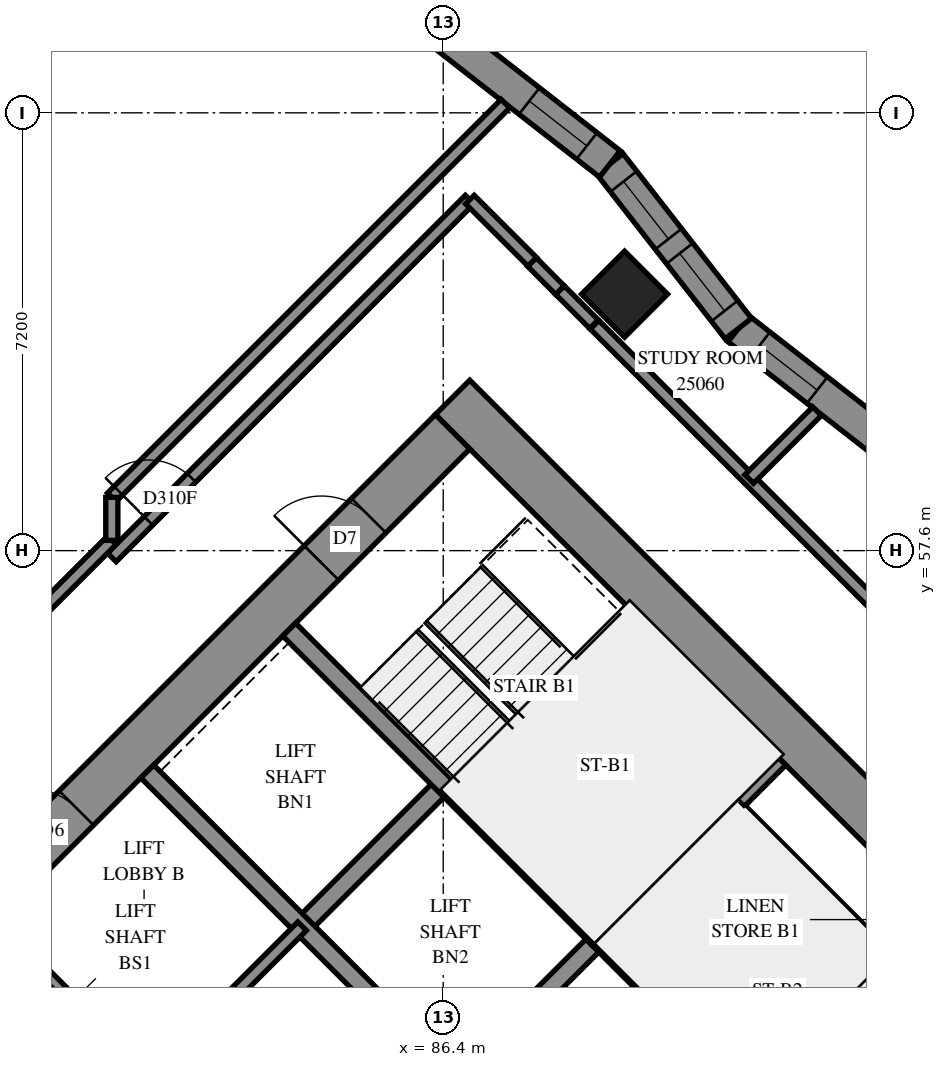
"""IFC4 building model, lengths in metres.
Left out: names, types, materials, properties, quantities, classifications, styles, units other than length and angle.
Written with IfcOpenShell. Run it as: python <this file> out.ifc"""

import sys

from ifc_helpers import new_model, si_unit, direction, frame, frame_2d, origin, origin_2d, place, context, subcontext, project, spatial, polyline, rectangle, outline, extrude, element, fill, save


model = new_model("IFC4")
c1 = context("Model", 3, precision=1e-05, world=origin(), true_north=direction((0.0, 1.0)))
c2 = subcontext(c1, "Body", "Model", "MODEL_VIEW")
j1 = project(units=[si_unit("LENGTHUNIT", "METRE"), si_unit("PLANEANGLEUNIT", "RADIAN")], contexts=[c1])
p1 = place(None, origin())
s1 = spatial("IfcSite", under=j1, at=p1, CompositionType="ELEMENT")
p2 = place(p1, origin())
s2 = spatial("IfcBuilding", under=s1, at=p2, CompositionType="ELEMENT")
p3 = place(p2, frame((0.0, 0.0, 94.8)))
s3 = spatial("IfcBuildingStorey", under=s2, at=p3, CompositionType="ELEMENT", Elevation=94.8)
p4 = place(p3, frame((89.382, 61.818, 0.0), z_axis=(0.0, 0.0, 1.0), x_axis=(0.7071067812, -0.7071067812, 0.0)))
e1 = element("IfcColumn", 1, at=p4, inside=s3, PredefinedType="COLUMN", context=c2, shape_type="SweptSolid", body=[
    extrude(rectangle(XDim=1.0, YDim=1.0, at=origin_2d()), origin(), (0.0, 0.0, 1.0), 3.1),
])
p5 = place(p3, frame((86.554, 60.121, -0.3), z_axis=(0.0, 0.0, 1.0), x_axis=(0.7071067812, -0.7071067812, 0.0)))
e2 = element("IfcWall", 2, at=p5, inside=s3, PredefinedType="SHEAR", context=c2, shape_type="SweptSolid", body=[
    extrude(rectangle(XDim=16.0, YDim=0.8, at=frame_2d((8.0, 0.0))), origin(), (0.0, 0.0, 1.0), 2.7),
])
p6 = place(p5, frame((10.8, 0.0, 0.3)))
e3 = element("IfcOpeningElement", 3, at=p6, cuts=e2, PredefinedType="OPENING", context=c2, shape_type="SweptSolid", body=[
    extrude(rectangle(XDim=0.8, YDim=2.1, at=frame_2d((0.4, 1.05))), frame((0.0, 0.41, 0.0), z_axis=(0.0, -1.0, 0.0), x_axis=(1.0, 0.0, 0.0)), (0.0, 0.0, 1.0), 0.82),
])
p7 = place(p3, frame((76.372, 49.373, -0.3), z_axis=(0.0, 0.0, 1.0), x_axis=(0.7071067812, 0.7071067812, 0.0)))
e4 = element("IfcWall", 4, at=p7, inside=s3, PredefinedType="SHEAR", context=c2, shape_type="SweptSolid", body=[
    extrude(rectangle(XDim=14.4, YDim=0.8, at=frame_2d((7.2, 0.0))), origin(), (0.0, 0.0, 1.0), 2.7),
])
p8 = place(p7, frame((4.55, 0.0, 0.3)))
e5 = element("IfcOpeningElement", 5, at=p8, cuts=e4, PredefinedType="OPENING", context=c2, shape_type="SweptSolid", body=[
    extrude(rectangle(XDim=1.1, YDim=2.1, at=frame_2d((0.55, 1.05))), frame((0.0, 0.41, 0.0), z_axis=(0.0, -1.0, 0.0), x_axis=(1.0, 0.0, 0.0)), (0.0, 0.0, 1.0), 0.82),
])
p9 = place(p7, frame((11.35, 0.0, 0.3)))
e6 = element("IfcOpeningElement", 6, at=p9, cuts=e4, PredefinedType="OPENING", context=c2, shape_type="SweptSolid", body=[
    extrude(rectangle(XDim=1.1, YDim=2.1, at=frame_2d((0.55, 1.05))), frame((0.0, 0.41, 0.0), z_axis=(0.0, -1.0, 0.0), x_axis=(1.0, 0.0, 0.0)), (0.0, 0.0, 1.0), 0.82),
])
p10 = place(p3, frame((84.079, 51.423, 0.0), z_axis=(0.0, 0.0, 1.0), x_axis=(0.7071219326, 0.7070916295, 0.0)))
e7 = element("IfcWall", 7, at=p10, inside=s3, PredefinedType="SOLIDWALL", context=c2, shape_type="SweptSolid", body=[
    extrude(rectangle(XDim=3.3, YDim=0.3, at=frame_2d((1.65, 0.0))), origin(), (0.0, 0.0, 1.0), 3.1),
])
p11 = place(p3, frame((86.625, 48.878, 0.0), z_axis=(0.0, 0.0, 1.0), x_axis=(0.7071067812, 0.7071067812, 0.0)))
e8 = element("IfcWall", 8, at=p11, inside=s3, PredefinedType="SOLIDWALL", context=c2, shape_type="SweptSolid", body=[
    extrude(rectangle(XDim=3.3, YDim=0.3, at=frame_2d((1.65, 0.0))), origin(), (0.0, 0.0, 1.0), 3.1),
])
p12 = place(p3, frame((78.988, 51.423, 0.0), z_axis=(0.0, 0.0, 1.0), x_axis=(0.7071067812, -0.7071067812, 0.0)))
e9 = element("IfcWall", 9, at=p12, inside=s3, PredefinedType="SOLIDWALL", context=c2, shape_type="SweptSolid", body=[
    extrude(rectangle(XDim=14.4, YDim=0.3, at=frame_2d((7.2, 0.0))), origin(), (0.0, 0.0, 1.0), 3.1),
])
p13 = place(p12, frame((1.25, 0.0, 0.0)))
e10 = element("IfcOpeningElement", 10, at=p13, cuts=e9, PredefinedType="OPENING", context=c2, shape_type="SweptSolid", body=[
    extrude(rectangle(XDim=1.1, YDim=2.1, at=frame_2d((0.55, 1.05))), frame((0.0, 0.16, 0.0), z_axis=(0.0, -1.0, 0.0), x_axis=(1.0, 0.0, 0.0)), (0.0, 0.0, 1.0), 0.32),
])
p14 = place(p12, frame((4.85, 0.0, 0.0)))
e11 = element("IfcOpeningElement", 11, at=p14, cuts=e9, PredefinedType="OPENING", context=c2, shape_type="SweptSolid", body=[
    extrude(rectangle(XDim=1.1, YDim=2.1, at=frame_2d((0.55, 1.05))), frame((0.0, 0.16, 0.0), z_axis=(0.0, -1.0, 0.0), x_axis=(1.0, 0.0, 0.0)), (0.0, 0.0, 1.0), 0.32),
])
p15 = place(p12, frame((8.45, 0.0, 0.0)))
e12 = element("IfcOpeningElement", 12, at=p15, cuts=e9, PredefinedType="OPENING", context=c2, shape_type="SweptSolid", body=[
    extrude(rectangle(XDim=1.1, YDim=2.1, at=frame_2d((0.55, 1.05))), frame((0.0, 0.16, 0.0), z_axis=(0.0, -1.0, 0.0), x_axis=(1.0, 0.0, 0.0)), (0.0, 0.0, 1.0), 0.32),
])
p16 = place(p12, frame((12.05, 0.0, 0.0)))
e13 = element("IfcOpeningElement", 13, at=p16, cuts=e9, PredefinedType="OPENING", context=c2, shape_type="SweptSolid", body=[
    extrude(rectangle(XDim=1.1, YDim=2.1, at=frame_2d((0.55, 1.05))), frame((0.0, 0.16, 0.0), z_axis=(0.0, -1.0, 0.0), x_axis=(1.0, 0.0, 0.0)), (0.0, 0.0, 1.0), 0.32),
])
p17 = place(p3, frame((81.534, 53.969, 0.0), z_axis=(0.0, 0.0, 1.0), x_axis=(0.707103309, -0.7071102534, 0.0)))
e14 = element("IfcWall", 14, at=p17, inside=s3, PredefinedType="SOLIDWALL", context=c2, shape_type="SweptSolid", body=[
    extrude(rectangle(XDim=14.4, YDim=0.3, at=frame_2d((7.2, 0.0))), origin(), (0.0, 0.0, 1.0), 3.1),
])
p18 = place(p17, frame((12.05, 0.0, 0.0)))
e15 = element("IfcOpeningElement", 15, at=p18, cuts=e14, PredefinedType="OPENING", context=c2, shape_type="SweptSolid", body=[
    extrude(rectangle(XDim=1.1, YDim=2.1, at=frame_2d((0.55, 1.05))), frame((0.0, 0.16, 0.0), z_axis=(0.0, -1.0, 0.0), x_axis=(1.0, 0.0, 0.0)), (0.0, 0.0, 1.0), 0.32),
])
for number, where, z_axis, x_axis in (
    (16, (83.867, 56.302, 0.0), (0.0, 0.0, 1.0), (0.707, -0.707, 0.0)),
    (17, (88.958, 51.211, 0.0), (0.0, 0.0, 1.0), (0.707, -0.707, 0.0)),
):
    element("IfcWall", number, at=place(p3, frame(where, z_axis=z_axis, x_axis=x_axis)), inside=s3, PredefinedType="SOLIDWALL", context=c2, shape_type="SweptSolid", body=[
        extrude(rectangle(XDim=7.2, YDim=0.3, at=frame_2d((3.6, 0.0))), origin(), (0.0, 0.0, 1.0), 3.1),
    ])
p19 = place(p3, frame((88.958, 51.211, 0.0), z_axis=(0.0, 0.0, 1.0), x_axis=(0.7071067812, 0.7071067812, 0.0)))
e18 = element("IfcWall", 18, at=p19, inside=s3, PredefinedType="SOLIDWALL", context=c2, shape_type="SweptSolid", body=[
    extrude(rectangle(XDim=4.2, YDim=0.3, at=frame_2d((2.1, 0.0))), origin(), (0.0, 0.0, 1.0), 3.1),
])
p20 = place(p3, frame((93.961, 59.139, 0.0), z_axis=(0.0, 0.0, 1.0), x_axis=(-0.788454577, 0.6150929849, 0.0)))
e19 = element("IfcWall", 19, at=p20, inside=s3, PredefinedType="SOLIDWALL", context=c2, shape_type="SweptSolid", body=[
    extrude(outline(polyline([(-0.034, -0.275), (3.401, -0.275), (3.468, 0.275), (0.034, 0.275), (-0.034, -0.275)])), origin(), (0.0, 0.0, 1.0), 3.1),
])
p21 = place(p20, frame((1.789, 0.0, 0.5)))
e20 = element("IfcOpeningElement", 20, at=p21, cuts=e19, PredefinedType="OPENING", context=c2, shape_type="SweptSolid", body=[
    extrude(rectangle(XDim=1.2, YDim=2.45, at=frame_2d((0.6, 1.225))), frame((0.0, 0.285, 0.0), z_axis=(0.0, -1.0, 0.0), x_axis=(1.0, 0.0, 0.0)), (0.0, 0.0, 1.0), 0.57),
])
p22 = place(p3, frame((91.253, 61.252, 0.0), z_axis=(0.0, 0.0, 1.0), x_axis=(-0.6150929849, 0.788454577, 0.0)))
e21 = element("IfcWall", 21, at=p22, inside=s3, PredefinedType="SOLIDWALL", context=c2, shape_type="SweptSolid", body=[
    extrude(outline(polyline([(0.034, -0.275), (3.468, -0.275), (3.401, 0.275), (-0.034, 0.275), (0.034, -0.275)])), origin(), (0.0, 0.0, 1.0), 3.1),
])
p23 = place(p22, frame((0.368, 0.0, 0.5)))
e22 = element("IfcOpeningElement", 22, at=p23, cuts=e21, PredefinedType="OPENING", context=c2, shape_type="SweptSolid", body=[
    extrude(rectangle(XDim=1.2, YDim=2.45, at=frame_2d((0.6, 1.225))), frame((0.0, 0.285, 0.0), z_axis=(0.0, -1.0, 0.0), x_axis=(1.0, 0.0, 0.0)), (0.0, 0.0, 1.0), 0.57),
])
p24 = place(p22, frame((1.868, 0.0, 0.5)))
e23 = element("IfcOpeningElement", 23, at=p24, cuts=e21, PredefinedType="OPENING", context=c2, shape_type="SweptSolid", body=[
    extrude(rectangle(XDim=1.2, YDim=2.45, at=frame_2d((0.6, 1.225))), frame((0.0, 0.285, 0.0), z_axis=(0.0, -1.0, 0.0), x_axis=(1.0, 0.0, 0.0)), (0.0, 0.0, 1.0), 0.57),
])
p25 = place(p3, frame((89.141, 63.96, 0.0), z_axis=(0.0, 0.0, 1.0), x_axis=(-0.788454577, 0.6150929849, 0.0)))
e24 = element("IfcWall", 24, at=p25, inside=s3, PredefinedType="SOLIDWALL", context=c2, shape_type="SweptSolid", body=[
    extrude(outline(polyline([(-0.034, -0.275), (3.401, -0.275), (3.468, 0.275), (0.034, 0.275), (-0.034, -0.275)])), origin(), (0.0, 0.0, 1.0), 3.1),
])
p26 = place(p25, frame((0.481, 0.0, 0.5)))
e25 = element("IfcOpeningElement", 25, at=p26, cuts=e24, PredefinedType="OPENING", context=c2, shape_type="SweptSolid", body=[
    extrude(rectangle(XDim=1.2, YDim=2.45, at=frame_2d((0.6, 1.225))), frame((0.0, 0.285, 0.0), z_axis=(0.0, -1.0, 0.0), x_axis=(1.0, 0.0, 0.0)), (0.0, 0.0, 1.0), 0.57),
])
p27 = place(p3, frame((91.313, 53.354, 0.0), z_axis=(0.0, 0.0, 1.0), x_axis=(0.7071147811, -0.7070987812, 0.0)))
e26 = element("IfcWall", 26, at=p27, inside=s3, PredefinedType="PARTITIONING", context=c2, shape_type="SweptSolid", body=[
    extrude(rectangle(XDim=6.25, YDim=0.15, at=frame_2d((3.125, 0.0))), origin(), (0.0, 0.0, 1.0), 3.1),
])
p28 = place(p3, frame((81.534, 48.878, 0.0), z_axis=(0.0, 0.0, 1.0), x_axis=(0.707092892, 0.7071206701, 0.0)))
e27 = element("IfcWall", 27, at=p28, inside=s3, PredefinedType="PARTITIONING", context=c2, shape_type="SweptSolid", body=[
    extrude(rectangle(XDim=3.6, YDim=0.2, at=frame_2d((1.8, 0.0))), origin(), (0.0, 0.0, 1.0), 3.1),
])
p29 = place(p3, frame((80.949, 58.477, 0.0), z_axis=(0.0, 0.0, 1.0), x_axis=(0.7071122423, 0.7071013201, 0.0)))
e28 = element("IfcWall", 28, at=p29, inside=s3, PredefinedType="PARTITIONING", context=c2, shape_type="SweptSolid", body=[
    extrude(rectangle(XDim=9.156, YDim=0.2, at=frame_2d((4.578, 0.0))), origin(), (0.0, 0.0, 1.0), 3.1),
])
p30 = place(p3, frame((80.951, 57.489, 0.0), z_axis=(0.0, 0.0, 1.0), x_axis=(0.7071067812, 0.7071067812, 0.0)))
e29 = element("IfcWall", 29, at=p30, inside=s3, PredefinedType="PARTITIONING", context=c2, shape_type="SweptSolid", body=[
    extrude(rectangle(XDim=8.321, YDim=0.2, at=frame_2d((4.161, 0.0))), origin(), (0.0, 0.0, 1.0), 3.1),
])
p31 = place(p30, frame((0.851, 0.0, 0.0)))
e30 = element("IfcOpeningElement", 30, at=p31, cuts=e29, PredefinedType="OPENING", context=c2, shape_type="SweptSolid", body=[
    extrude(rectangle(XDim=1.0, YDim=2.1, at=frame_2d((0.5, 1.05))), frame((0.0, 0.11, 0.0), z_axis=(0.0, -1.0, 0.0), x_axis=(1.0, 0.0, 0.0)), (0.0, 0.0, 1.0), 0.22),
])
p32 = place(p3, frame((88.889, 61.315, 0.0), z_axis=(0.0, 0.0, 1.0), x_axis=(0.7071067812, -0.7071067812, 0.0)))
e31 = element("IfcWall", 31, at=p32, inside=s3, PredefinedType="PARTITIONING", context=c2, shape_type="SweptSolid", body=[
    extrude(rectangle(XDim=7.187, YDim=0.2, at=frame_2d((3.594, 0.0))), origin(), (0.0, 0.0, 1.0), 3.1),
])
p33 = place(p3, frame((79.802, 56.623, 0.0), z_axis=(0.0, 0.0, 1.0), x_axis=(0.7071067812, 0.7071067812, 0.0)))
e32 = element("IfcWall", 32, at=p33, inside=s3, PredefinedType="PARTITIONING", context=c2, shape_type="SweptSolid", body=[
    extrude(rectangle(XDim=1.623, YDim=0.2, at=frame_2d((0.812, 0.0))), origin(), (0.0, 0.0, 1.0), 3.1),
])
p34 = place(p3, frame((91.432, 58.778, 0.0), z_axis=(0.0, 0.0, 1.0), x_axis=(0.7071067812, 0.7071067812, 0.0)))
e33 = element("IfcWall", 33, at=p34, inside=s3, PredefinedType="PARTITIONING", context=c2, shape_type="SweptSolid", body=[
    extrude(rectangle(XDim=1.578, YDim=0.2, at=frame_2d((0.789, 0.0))), origin(), (0.0, 0.0, 1.0), 3.1),
])
p35 = place(p3, frame((86.839, 63.373, 0.0), z_axis=(0.0, 0.0, 1.0), x_axis=(0.7077963046, -0.7064165847, 0.0)))
e34 = element("IfcWall", 34, at=p35, inside=s3, PredefinedType="PARTITIONING", context=c2, shape_type="SweptSolid", body=[
    extrude(rectangle(XDim=1.45, YDim=0.2, at=frame_2d((0.725, 0.0))), origin(), (0.0, 0.0, 1.0), 3.1),
])
p36 = place(p3, frame((88.319, 61.885, 0.0), z_axis=(0.0, 0.0, 1.0), x_axis=(0.7071067812, -0.7071067812, 0.0)))
e35 = element("IfcWall", 35, at=p36, inside=s3, PredefinedType="PARTITIONING", context=c2, shape_type="SweptSolid", body=[
    extrude(rectangle(XDim=0.792, YDim=0.2, at=frame_2d((0.396, 0.0))), origin(), (0.0, 0.0, 1.0), 3.1),
])
p37 = place(p3, frame((80.95, 57.77, 0.0), z_axis=(0.0, 0.0, 1.0), x_axis=(0.0, 1.0, 0.0)))
e36 = element("IfcWall", 36, at=p37, inside=s3, PredefinedType="PARTITIONING", context=c2, shape_type="SweptSolid", body=[
    extrude(rectangle(XDim=0.706, YDim=0.2, at=frame_2d((0.353, 0.0))), origin(), (0.0, 0.0, 1.0), 3.1),
])
p38 = place(p3, frame((87.861, 62.344, 0.0), z_axis=(0.0, 0.0, 1.0), x_axis=(0.7055645691, -0.708645637, 0.0)))
e37 = element("IfcWall", 37, at=p38, inside=s3, PredefinedType="PARTITIONING", context=c2, shape_type="SweptSolid", body=[
    extrude(rectangle(XDim=0.649, YDim=0.2, at=frame_2d((0.325, 0.0))), origin(), (0.0, 0.0, 1.0), 3.1),
])
p39 = place(p21, origin())
e38 = element("IfcWindow", 38, at=p39, inside=s3, PartitioningType="SINGLE_PANEL", PredefinedType="WINDOW", context=c2, shape_type="SweptSolid", body=[
    extrude(rectangle(XDim=1.2, YDim=2.45, at=frame_2d((0.6, 1.225))), frame((0.0, 0.155, 0.0), z_axis=(0.0, -1.0, 0.0), x_axis=(1.0, 0.0, 0.0)), (0.0, 0.0, 1.0), 0.06),
])
fill(e20, e38)
p40 = place(p23, origin())
e39 = element("IfcWindow", 39, at=p40, inside=s3, PartitioningType="SINGLE_PANEL", PredefinedType="WINDOW", context=c2, shape_type="SweptSolid", body=[
    extrude(rectangle(XDim=1.2, YDim=2.45, at=frame_2d((0.6, 1.225))), frame((0.0, 0.155, 0.0), z_axis=(0.0, -1.0, 0.0), x_axis=(1.0, 0.0, 0.0)), (0.0, 0.0, 1.0), 0.06),
])
fill(e22, e39)
p41 = place(p24, origin())
e40 = element("IfcWindow", 40, at=p41, inside=s3, PartitioningType="SINGLE_PANEL", PredefinedType="WINDOW", context=c2, shape_type="SweptSolid", body=[
    extrude(rectangle(XDim=1.2, YDim=2.45, at=frame_2d((0.6, 1.225))), frame((0.0, 0.155, 0.0), z_axis=(0.0, -1.0, 0.0), x_axis=(1.0, 0.0, 0.0)), (0.0, 0.0, 1.0), 0.06),
])
fill(e23, e40)
p42 = place(p26, origin())
e41 = element("IfcWindow", 41, at=p42, inside=s3, PartitioningType="SINGLE_PANEL", PredefinedType="WINDOW", context=c2, shape_type="SweptSolid", body=[
    extrude(rectangle(XDim=1.2, YDim=2.45, at=frame_2d((0.6, 1.225))), frame((0.0, 0.155, 0.0), z_axis=(0.0, -1.0, 0.0), x_axis=(1.0, 0.0, 0.0)), (0.0, 0.0, 1.0), 0.06),
])
fill(e25, e41)
p43 = place(p8, origin())
e42 = element("IfcDoor", 42, at=p43, inside=s3, OperationType="DOUBLE_DOOR_SINGLE_SWING", PredefinedType="DOOR", context=c2, shape_type="SweptSolid", body=[
    extrude(rectangle(XDim=1.1, YDim=2.1, at=frame_2d((0.55, 1.05))), frame((0.0, 0.025, 0.0), z_axis=(0.0, -1.0, 0.0), x_axis=(1.0, 0.0, 0.0)), (0.0, 0.0, 1.0), 0.05),
])
fill(e5, e42)
p44 = place(p9, origin())
e43 = element("IfcDoor", 43, at=p44, inside=s3, OperationType="SINGLE_SWING_LEFT", PredefinedType="DOOR", context=c2, shape_type="SweptSolid", body=[
    extrude(rectangle(XDim=1.1, YDim=2.1, at=frame_2d((0.55, 1.05))), frame((0.0, 0.025, 0.0), z_axis=(0.0, -1.0, 0.0), x_axis=(1.0, 0.0, 0.0)), (0.0, 0.0, 1.0), 0.05),
])
fill(e6, e43)
p45 = place(p13, origin())
e44 = element("IfcDoor", 44, at=p45, inside=s3, OperationType="SLIDING_TO_LEFT", PredefinedType="DOOR", context=c2, shape_type="SweptSolid", body=[
    extrude(rectangle(XDim=1.1, YDim=2.1, at=frame_2d((0.55, 1.05))), frame((0.0, 0.025, 0.0), z_axis=(0.0, -1.0, 0.0), x_axis=(1.0, 0.0, 0.0)), (0.0, 0.0, 1.0), 0.05),
])
fill(e10, e44)
p46 = place(p31, origin())
e45 = element("IfcDoor", 45, at=p46, inside=s3, OperationType="SINGLE_SWING_RIGHT", PredefinedType="DOOR", context=c2, shape_type="SweptSolid", body=[
    extrude(rectangle(XDim=1.0, YDim=2.1, at=frame_2d((0.5, 1.05))), frame((0.0, 0.025, 0.0), z_axis=(0.0, -1.0, 0.0), x_axis=(1.0, 0.0, 0.0)), (0.0, 0.0, 1.0), 0.05),
])
fill(e30, e45)
save(model, sys.argv[1])
